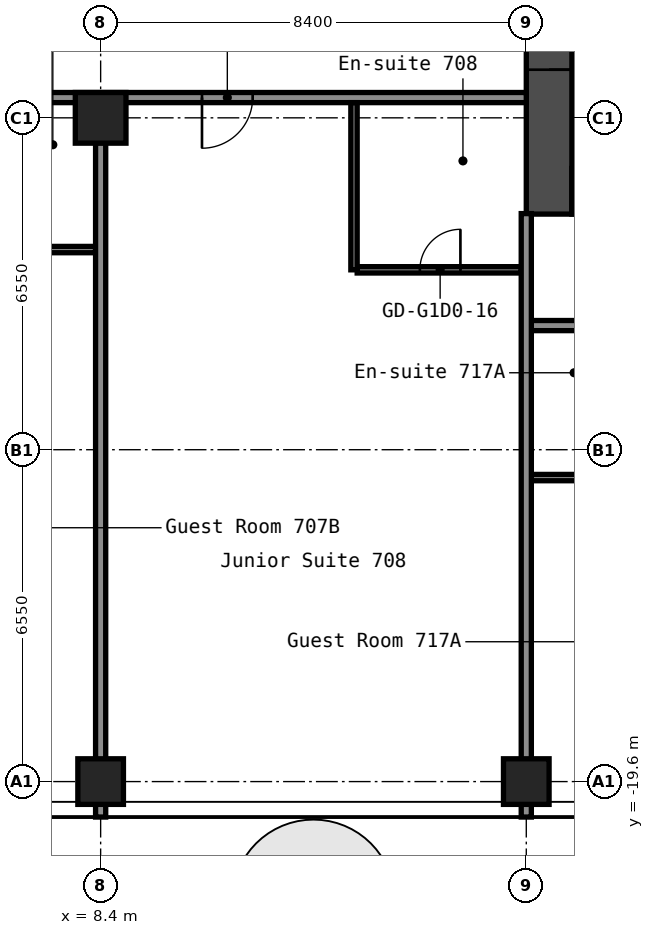
"""IFC4 building model, lengths in metres.
Left out: names, types, materials, properties, quantities, classifications, styles, units other than length and angle.
Written with IfcOpenShell. Run it as: python <this file> out.ifc"""

import sys

from ifc_helpers import new_model, si_unit, direction, frame, frame_2d, origin, origin_2d, place, context, subcontext, project, spatial, rectangle, hollow_rectangle, extrude, element, fill, save


model = new_model("IFC4")
c1 = context("Model", 3, precision=1e-05, world=origin(), true_north=direction((0.0, 1.0)))
c2 = subcontext(c1, "Body", "Model", "MODEL_VIEW")
j1 = project(units=[si_unit("LENGTHUNIT", "METRE"), si_unit("PLANEANGLEUNIT", "RADIAN")], contexts=[c1])
p1 = place(None, origin())
s1 = spatial("IfcSite", under=j1, at=p1, CompositionType="ELEMENT")
p2 = place(p1, origin())
s2 = spatial("IfcBuilding", under=s1, at=p2, CompositionType="ELEMENT")
p3 = place(p2, frame((0.0, 0.0, 29.4)))
s3 = spatial("IfcBuildingStorey", under=s2, at=p3, CompositionType="ELEMENT", Elevation=29.4)
p4 = place(p3, frame((8.4, -19.6, 0.0), z_axis=(0.0, 0.0, 1.0), x_axis=(1.0, 0.0, 0.0)))
e1 = element("IfcColumn", 1, at=p4, inside=s3, PredefinedType="COLUMN", context=c2, shape_type="SweptSolid", body=[
    extrude(hollow_rectangle(XDim=0.9, YDim=0.9, WallThickness=0.036, at=origin_2d()), origin(), (0.0, 0.0, 1.0), 2.8),
])
p5 = place(p3, frame((8.4, -6.5, 0.0), z_axis=(0.0, 0.0, 1.0), x_axis=(1.0, 0.0, 0.0)))
e2 = element("IfcColumn", 2, at=p5, inside=s3, PredefinedType="COLUMN", context=c2, shape_type="SweptSolid", body=[
    extrude(hollow_rectangle(XDim=1.0, YDim=1.0, WallThickness=0.04, at=origin_2d()), origin(), (0.0, 0.0, 1.0), 2.8),
])
p6 = place(p3, frame((16.8, -19.6, 0.0), z_axis=(0.0, 0.0, 1.0), x_axis=(1.0, 0.0, 0.0)))
e3 = element("IfcColumn", 3, at=p6, inside=s3, PredefinedType="COLUMN", context=c2, shape_type="SweptSolid", body=[
    extrude(hollow_rectangle(XDim=0.9, YDim=0.9, WallThickness=0.036, at=origin_2d()), origin(), (0.0, 0.0, 1.0), 2.8),
])
p7 = place(p3, frame((17.25, -8.4, 0.0), z_axis=(0.0, 0.0, 1.0), x_axis=(0.0, 1.0, 0.0)))
e4 = element("IfcWall", 4, at=p7, inside=s3, PredefinedType="SHEAR", context=c2, shape_type="SweptSolid", body=[
    extrude(rectangle(XDim=16.8, YDim=0.9, at=frame_2d((8.4, 0.0))), origin(), (0.0, 0.0, 1.0), 2.8),
])
p8 = place(p7, frame((12.75, 0.0, 0.0)))
e5 = element("IfcOpeningElement", 5, at=p8, cuts=e4, PredefinedType="OPENING", context=c2, shape_type="SweptSolid", body=[
    extrude(rectangle(XDim=1.2, YDim=2.1, at=frame_2d((0.6, 1.05))), frame((0.0, 0.46, 0.0), z_axis=(0.0, -1.0, 0.0), x_axis=(1.0, 0.0, 0.0)), (0.0, 0.0, 1.0), 0.92),
])
p9 = place(p7, frame((2.85, 0.0, 0.0)))
e6 = element("IfcOpeningElement", 6, at=p9, cuts=e4, PredefinedType="OPENING", context=c2, shape_type="SweptSolid", body=[
    extrude(rectangle(XDim=1.2, YDim=2.1, at=frame_2d((0.6, 1.05))), frame((0.0, 0.46, 0.0), z_axis=(0.0, -1.0, 0.0), x_axis=(1.0, 0.0, 0.0)), (0.0, 0.0, 1.0), 0.92),
])
p10 = place(p3, frame((17.7, -7.95, 0.0), z_axis=(0.0, 0.0, 1.0), x_axis=(1.0, 0.0, 0.0)))
e7 = element("IfcWall", 7, at=p10, inside=s3, PredefinedType="SHEAR", context=c2, shape_type="SweptSolid", body=[
    extrude(rectangle(XDim=15.0, YDim=0.9, at=frame_2d((7.5, 0.0))), origin(), (0.0, 0.0, 1.0), 2.8),
])
p11 = place(p10, frame((2.55, 0.0, 0.0)))
e8 = element("IfcOpeningElement", 8, at=p11, cuts=e7, PredefinedType="OPENING", context=c2, shape_type="SweptSolid", body=[
    extrude(rectangle(XDim=1.0, YDim=2.1, at=frame_2d((0.5, 1.05))), frame((0.0, 0.46, 0.0), z_axis=(0.0, -1.0, 0.0), x_axis=(1.0, 0.0, 0.0)), (0.0, 0.0, 1.0), 0.92),
])
p12 = place(p3, frame((16.9, -13.6, 0.0), z_axis=(0.0, 0.0, 1.0), x_axis=(1.0, 0.0, 0.0)))
e9 = element("IfcWall", 9, at=p12, inside=s3, PredefinedType="PARTITIONING", context=c2, shape_type="SweptSolid", body=[
    extrude(rectangle(XDim=2.338, YDim=0.125, at=frame_2d((1.169, 0.0))), origin(), (0.0, 0.0, 1.0), 2.8),
])
p13 = place(p3, frame((16.8, -10.6, 0.0), z_axis=(0.0, 0.0, 1.0), x_axis=(1.0, 0.0, 0.0)))
e10 = element("IfcWall", 10, at=p13, inside=s3, PredefinedType="PARTITIONING", context=c2, shape_type="SweptSolid", body=[
    extrude(rectangle(XDim=34.3, YDim=0.2, at=frame_2d((17.15, 0.0))), origin(), (0.0, 0.0, 1.0), 2.8),
])
p14 = place(p13, frame((2.85, 0.0, 0.0)))
e11 = element("IfcOpeningElement", 11, at=p14, cuts=e10, PredefinedType="OPENING", context=c2, shape_type="SweptSolid", body=[
    extrude(rectangle(XDim=1.0, YDim=2.1, at=frame_2d((0.5, 1.05))), frame((0.0, 0.11, 0.0), z_axis=(0.0, -1.0, 0.0), x_axis=(1.0, 0.0, 0.0)), (0.0, 0.0, 1.0), 0.22),
])
p15 = place(p13, frame((4.55, 0.0, 0.0)))
e12 = element("IfcOpeningElement", 12, at=p15, cuts=e10, PredefinedType="OPENING", context=c2, shape_type="SweptSolid", body=[
    extrude(rectangle(XDim=1.0, YDim=2.1, at=frame_2d((0.5, 1.05))), frame((0.0, 0.11, 0.0), z_axis=(0.0, -1.0, 0.0), x_axis=(1.0, 0.0, 0.0)), (0.0, 0.0, 1.0), 0.22),
])
p16 = place(p13, frame((13.8, 0.0, 0.0)))
e13 = element("IfcOpeningElement", 13, at=p16, cuts=e10, PredefinedType="OPENING", context=c2, shape_type="SweptSolid", body=[
    extrude(rectangle(XDim=1.0, YDim=2.1, at=frame_2d((0.5, 1.05))), frame((0.0, 0.11, 0.0), z_axis=(0.0, -1.0, 0.0), x_axis=(1.0, 0.0, 0.0)), (0.0, 0.0, 1.0), 0.22),
])
p17 = place(p13, frame((19.65, 0.0, 0.0)))
e14 = element("IfcOpeningElement", 14, at=p17, cuts=e10, PredefinedType="OPENING", context=c2, shape_type="SweptSolid", body=[
    extrude(rectangle(XDim=1.0, YDim=2.1, at=frame_2d((0.5, 1.05))), frame((0.0, 0.11, 0.0), z_axis=(0.0, -1.0, 0.0), x_axis=(1.0, 0.0, 0.0)), (0.0, 0.0, 1.0), 0.22),
])
p18 = place(p13, frame((21.35, 0.0, 0.0)))
e15 = element("IfcOpeningElement", 15, at=p18, cuts=e10, PredefinedType="OPENING", context=c2, shape_type="SweptSolid", body=[
    extrude(rectangle(XDim=1.0, YDim=2.1, at=frame_2d((0.5, 1.05))), frame((0.0, 0.11, 0.0), z_axis=(0.0, -1.0, 0.0), x_axis=(1.0, 0.0, 0.0)), (0.0, 0.0, 1.0), 0.22),
])
p19 = place(p13, frame((30.8, 0.0, 0.0)))
e16 = element("IfcOpeningElement", 16, at=p19, cuts=e10, PredefinedType="OPENING", context=c2, shape_type="SweptSolid", body=[
    extrude(rectangle(XDim=1.0, YDim=2.1, at=frame_2d((0.5, 1.05))), frame((0.0, 0.11, 0.0), z_axis=(0.0, -1.0, 0.0), x_axis=(1.0, 0.0, 0.0)), (0.0, 0.0, 1.0), 0.22),
])
p20 = place(p3, frame((13.462, -9.5, 0.0), z_axis=(0.0, 0.0, 1.0), x_axis=(1.0, 0.0, 0.0)))
e17 = element("IfcWall", 17, at=p20, inside=s3, PredefinedType="PARTITIONING", context=c2, shape_type="SweptSolid", body=[
    extrude(rectangle(XDim=3.238, YDim=0.125, at=frame_2d((1.619, 0.0))), origin(), (0.0, 0.0, 1.0), 2.8),
])
p21 = place(p20, frame((1.238, 0.0, 0.0)))
e18 = element("IfcOpeningElement", 18, at=p21, cuts=e17, PredefinedType="OPENING", context=c2, shape_type="SweptSolid", body=[
    extrude(rectangle(XDim=0.8, YDim=2.1, at=frame_2d((0.4, 1.05))), frame((0.0, 0.073, 0.0), z_axis=(0.0, -1.0, 0.0), x_axis=(1.0, 0.0, 0.0)), (0.0, 0.0, 1.0), 0.145),
])
p22 = place(p3, frame((5.962, -9.1, 0.0), z_axis=(0.0, 0.0, 1.0), x_axis=(1.0, 0.0, 0.0)))
e19 = element("IfcWall", 19, at=p22, inside=s3, PredefinedType="PARTITIONING", context=c2, shape_type="SweptSolid", body=[
    extrude(rectangle(XDim=2.338, YDim=0.125, at=frame_2d((1.169, 0.0))), origin(), (0.0, 0.0, 1.0), 2.8),
])
p23 = place(p3, frame((-16.8, -6.1, 0.0), z_axis=(0.0, 0.0, 1.0), x_axis=(1.0, 0.0, 0.0)))
e20 = element("IfcWall", 20, at=p23, inside=s3, PredefinedType="PARTITIONING", context=c2, shape_type="SweptSolid", body=[
    extrude(rectangle(XDim=33.6, YDim=0.2, at=frame_2d((16.8, 0.0))), origin(), (0.0, 0.0, 1.0), 2.8),
])
p24 = place(p23, frame((2.85, 0.0, 0.0)))
e21 = element("IfcOpeningElement", 21, at=p24, cuts=e20, PredefinedType="OPENING", context=c2, shape_type="SweptSolid", body=[
    extrude(rectangle(XDim=1.0, YDim=2.1, at=frame_2d((0.5, 1.05))), frame((0.0, 0.11, 0.0), z_axis=(0.0, -1.0, 0.0), x_axis=(1.0, 0.0, 0.0)), (0.0, 0.0, 1.0), 0.22),
])
p25 = place(p23, frame((4.55, 0.0, 0.0)))
e22 = element("IfcOpeningElement", 22, at=p25, cuts=e20, PredefinedType="OPENING", context=c2, shape_type="SweptSolid", body=[
    extrude(rectangle(XDim=1.0, YDim=2.1, at=frame_2d((0.5, 1.05))), frame((0.0, 0.11, 0.0), z_axis=(0.0, -1.0, 0.0), x_axis=(1.0, 0.0, 0.0)), (0.0, 0.0, 1.0), 0.22),
])
p26 = place(p23, frame((12.1, 0.0, 0.0)))
e23 = element("IfcOpeningElement", 23, at=p26, cuts=e20, PredefinedType="OPENING", context=c2, shape_type="SweptSolid", body=[
    extrude(rectangle(XDim=1.0, YDim=2.1, at=frame_2d((0.5, 1.05))), frame((0.0, 0.11, 0.0), z_axis=(0.0, -1.0, 0.0), x_axis=(1.0, 0.0, 0.0)), (0.0, 0.0, 1.0), 0.22),
])
p27 = place(p23, frame((19.65, 0.0, 0.0)))
e24 = element("IfcOpeningElement", 24, at=p27, cuts=e20, PredefinedType="OPENING", context=c2, shape_type="SweptSolid", body=[
    extrude(rectangle(XDim=1.0, YDim=2.1, at=frame_2d((0.5, 1.05))), frame((0.0, 0.11, 0.0), z_axis=(0.0, -1.0, 0.0), x_axis=(1.0, 0.0, 0.0)), (0.0, 0.0, 1.0), 0.22),
])
p28 = place(p23, frame((21.35, 0.0, 0.0)))
e25 = element("IfcOpeningElement", 25, at=p28, cuts=e20, PredefinedType="OPENING", context=c2, shape_type="SweptSolid", body=[
    extrude(rectangle(XDim=1.0, YDim=2.1, at=frame_2d((0.5, 1.05))), frame((0.0, 0.11, 0.0), z_axis=(0.0, -1.0, 0.0), x_axis=(1.0, 0.0, 0.0)), (0.0, 0.0, 1.0), 0.22),
])
p29 = place(p23, frame((27.2, 0.0, 0.0)))
e26 = element("IfcOpeningElement", 26, at=p29, cuts=e20, PredefinedType="OPENING", context=c2, shape_type="SweptSolid", body=[
    extrude(rectangle(XDim=1.0, YDim=2.1, at=frame_2d((0.5, 1.05))), frame((0.0, 0.11, 0.0), z_axis=(0.0, -1.0, 0.0), x_axis=(1.0, 0.0, 0.0)), (0.0, 0.0, 1.0), 0.22),
])
p30 = place(p3, frame((8.4, -20.3, 0.0), z_axis=(0.0, 0.0, 1.0), x_axis=(0.0, 1.0, 0.0)))
e27 = element("IfcWall", 27, at=p30, inside=s3, PredefinedType="PARTITIONING", context=c2, shape_type="SweptSolid", body=[
    extrude(rectangle(XDim=13.31, YDim=0.2, at=frame_2d((6.655, 0.0))), origin(), (0.0, 0.0, 1.0), 2.8),
])
p31 = place(p3, frame((13.4, -9.5, 0.0), z_axis=(0.0, 0.0, 1.0), x_axis=(0.0, 1.0, 0.0)))
e28 = element("IfcWall", 28, at=p31, inside=s3, PredefinedType="PARTITIONING", context=c2, shape_type="SweptSolid", body=[
    extrude(rectangle(XDim=3.3, YDim=0.125, at=frame_2d((1.65, 0.0))), origin(), (0.0, 0.0, 1.0), 2.8),
])
p32 = place(p3, frame((16.8, -20.3, 0.0), z_axis=(0.0, 0.0, 1.0), x_axis=(0.0, 1.0, 0.0)))
e29 = element("IfcWall", 29, at=p32, inside=s3, PredefinedType="PARTITIONING", context=c2, shape_type="SweptSolid", body=[
    extrude(rectangle(XDim=11.91, YDim=0.2, at=frame_2d((5.955, 0.0))), origin(), (0.0, 0.0, 1.0), 2.8),
])
p33 = place(p9, origin())
e30 = element("IfcDoor", 30, at=p33, inside=s3, OperationType="DOUBLE_DOOR_SINGLE_SWING", PredefinedType="DOOR", context=c2, shape_type="SweptSolid", body=[
    extrude(rectangle(XDim=1.2, YDim=2.1, at=frame_2d((0.6, 1.05))), frame((0.0, 0.025, 0.0), z_axis=(0.0, -1.0, 0.0), x_axis=(1.0, 0.0, 0.0)), (0.0, 0.0, 1.0), 0.05),
])
fill(e6, e30)
p34 = place(p21, origin())
e31 = element("IfcDoor", 31, at=p34, inside=s3, OperationType="SINGLE_SWING_LEFT", PredefinedType="DOOR", context=c2, shape_type="SweptSolid", body=[
    extrude(rectangle(XDim=0.8, YDim=2.1, at=frame_2d((0.4, 1.05))), frame((0.0, 0.025, 0.0), z_axis=(0.0, -1.0, 0.0), x_axis=(1.0, 0.0, 0.0)), (0.0, 0.0, 1.0), 0.05),
])
fill(e18, e31)
p35 = place(p29, origin())
e32 = element("IfcDoor", 32, at=p35, inside=s3, OperationType="SINGLE_SWING_LEFT", PredefinedType="DOOR", context=c2, shape_type="SweptSolid", body=[
    extrude(rectangle(XDim=1.0, YDim=2.1, at=frame_2d((0.5, 1.05))), frame((0.0, 0.025, 0.0), z_axis=(0.0, -1.0, 0.0), x_axis=(1.0, 0.0, 0.0)), (0.0, 0.0, 1.0), 0.05),
])
fill(e26, e32)
save(model, sys.argv[1])
